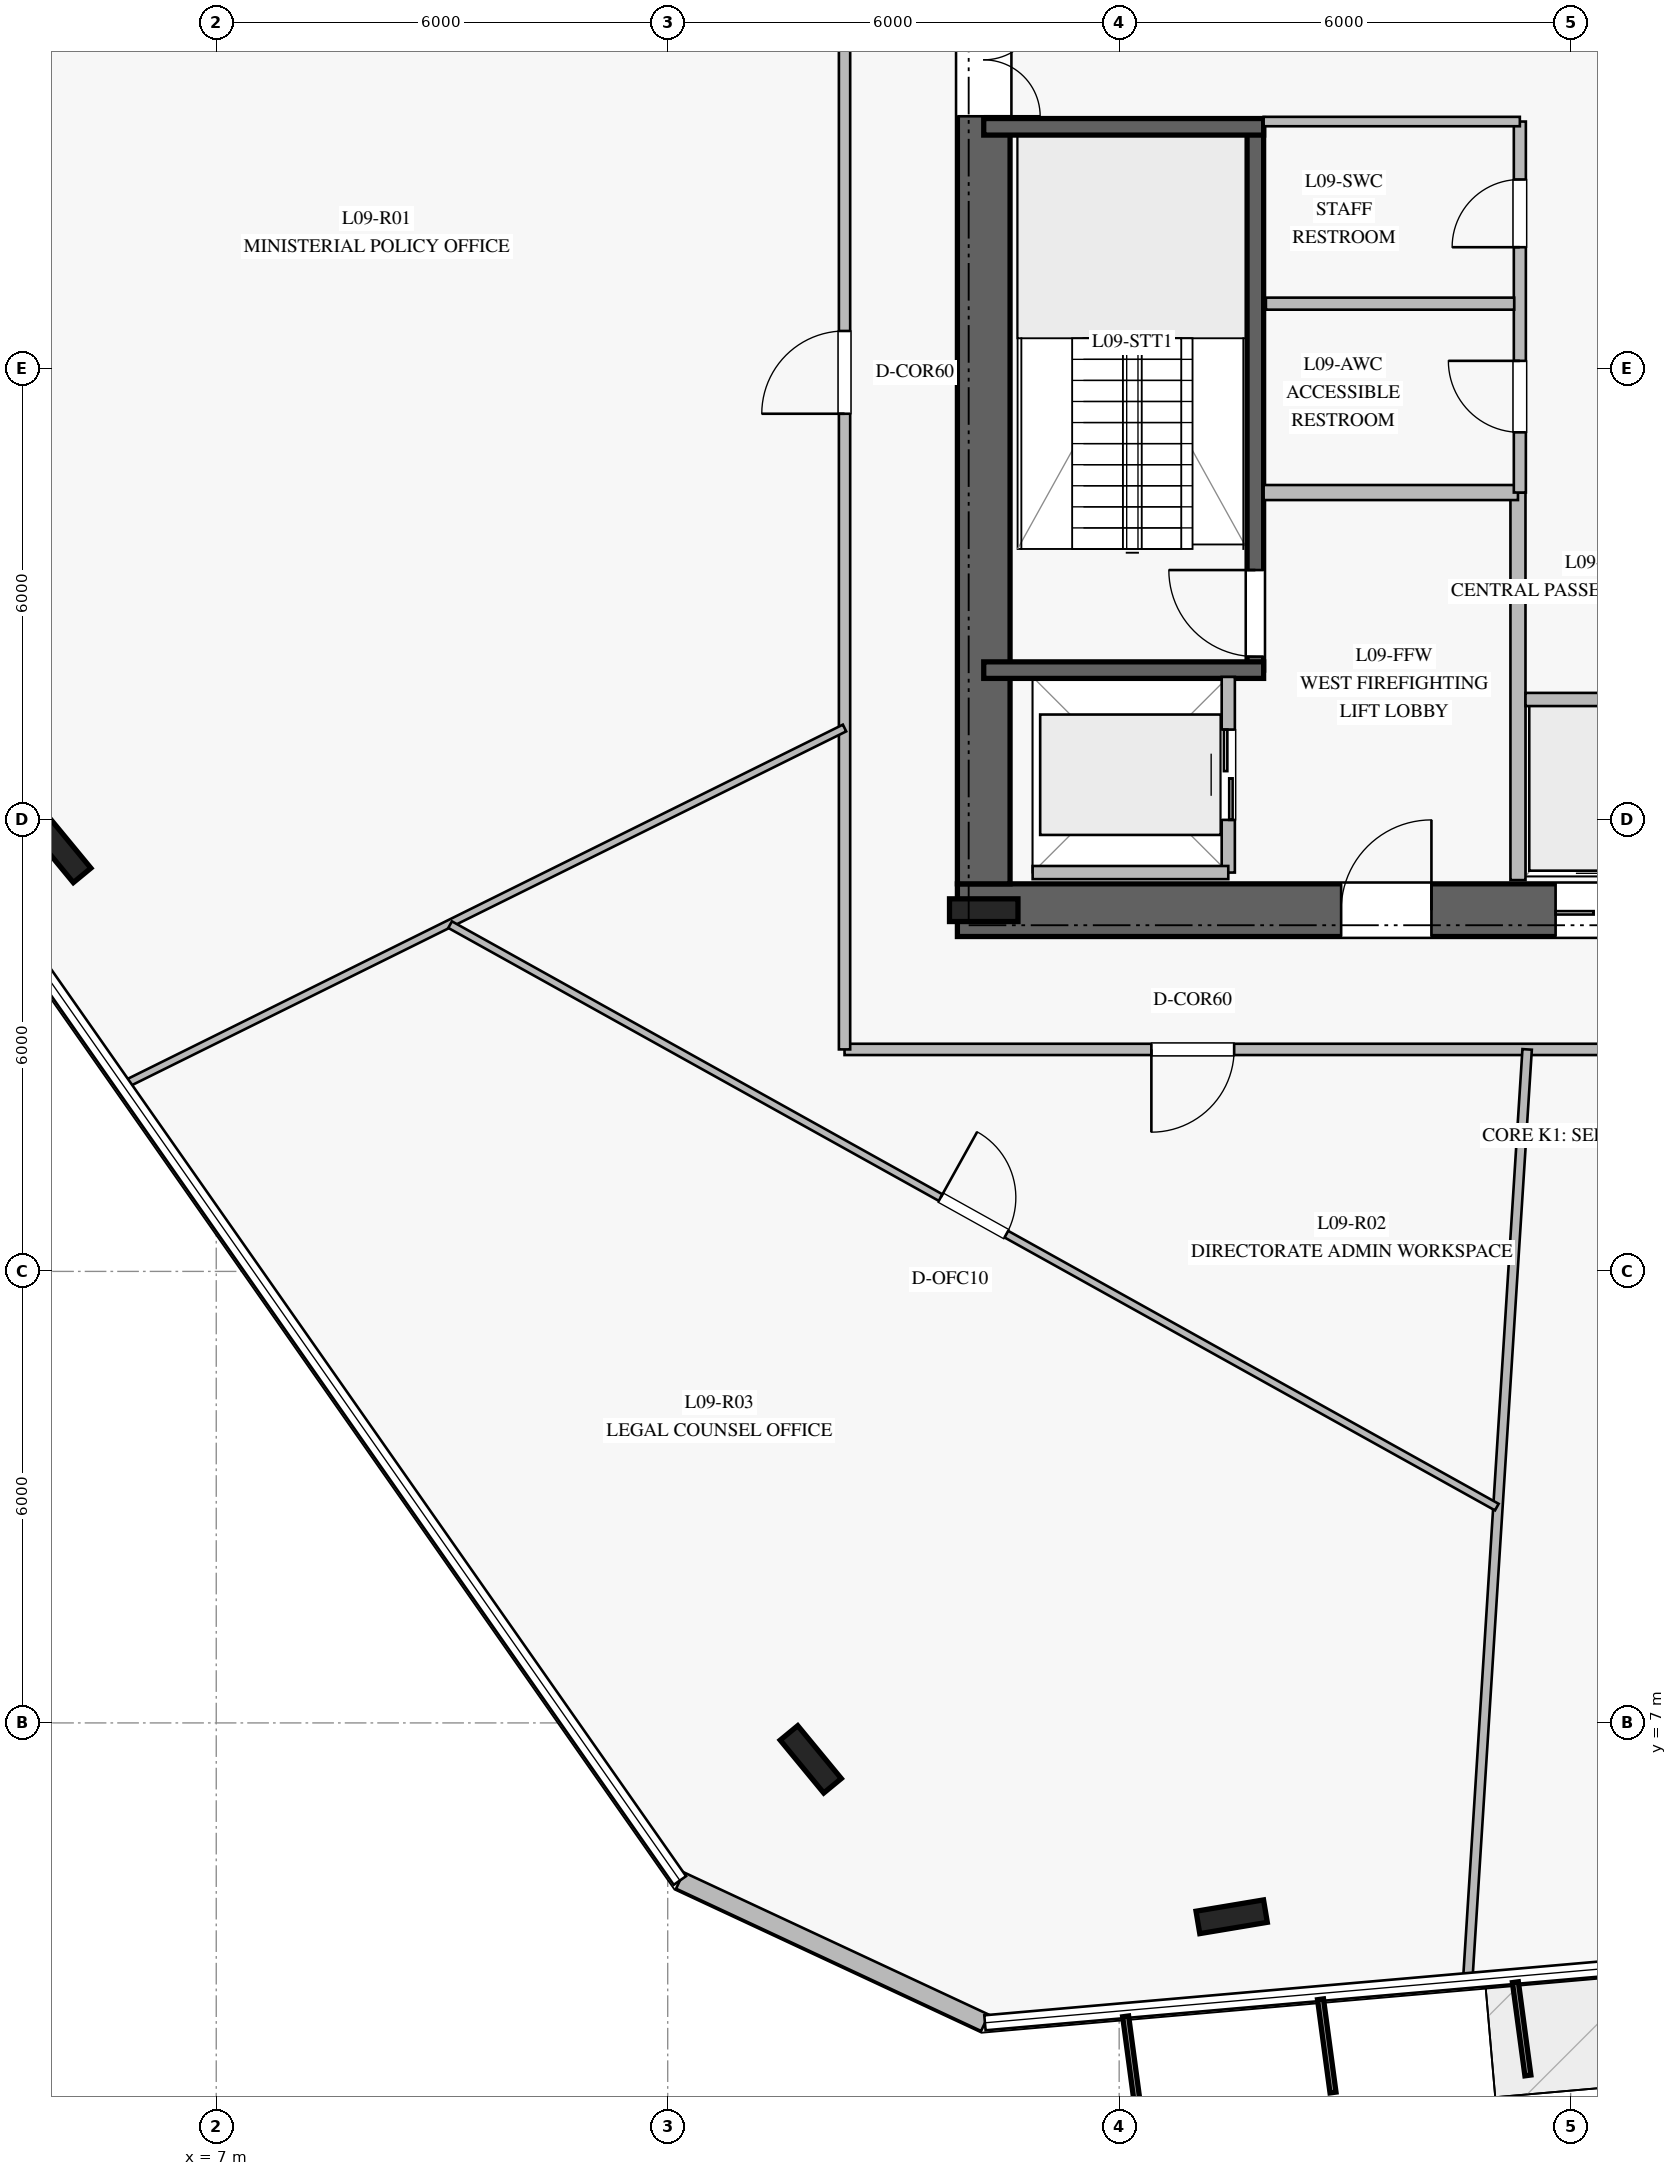
"""IFC4 building model, lengths in metres.
Left out: names, types, materials, properties, quantities, classifications, styles, units other than length and angle.
Written with IfcOpenShell. Run it as: python <this file> out.ifc"""

import sys

from ifc_helpers import new_model, si_unit, direction, frame, frame_2d, origin, origin_2d, place, context, subcontext, project, spatial, rectangle, i_section, extrude, element, fill, save


model = new_model("IFC4")
c1 = context("Model", 3, precision=1e-05, world=origin(), true_north=direction((0.0, 1.0)))
c2 = subcontext(c1, "Body", "Model", "MODEL_VIEW")
j1 = project(units=[si_unit("LENGTHUNIT", "METRE"), si_unit("PLANEANGLEUNIT", "RADIAN")], contexts=[c1])
p1 = place(None, origin())
s1 = spatial("IfcSite", under=j1, at=p1, CompositionType="ELEMENT")
p2 = place(p1, origin())
s2 = spatial("IfcBuilding", under=s1, at=p2, CompositionType="ELEMENT")
p3 = place(p2, frame((0.0, 0.0, 40.0)))
s3 = spatial("IfcBuildingStorey", under=s2, at=p3, CompositionType="ELEMENT", Elevation=40.0)
p4 = place(p3, frame((16.85, 17.8, 0.0), z_axis=(0.0, 0.0, 1.0), x_axis=(1.0, 0.0, 0.0)))
e1 = element("IfcWall", 1, at=p4, inside=s3, PredefinedType="SHEAR", context=c2, shape_type="SweptSolid", body=[
    extrude(rectangle(XDim=16.3, YDim=0.7, at=frame_2d((8.15, 0.0))), origin(), (0.0, 0.0, 1.0), 3.76),
])
p5 = place(p4, frame((5.1, 0.0, 0.0)))
e2 = element("IfcOpeningElement", 2, at=p5, cuts=e1, PredefinedType="OPENING", context=c2, shape_type="SweptSolid", body=[
    extrude(rectangle(XDim=1.2, YDim=2.25, at=frame_2d((0.6, 1.125))), frame((0.0, 0.36, 0.0), z_axis=(0.0, -1.0, 0.0), x_axis=(1.0, 0.0, 0.0)), (0.0, 0.0, 1.0), 0.72),
])
p6 = place(p4, frame((14.05, 0.0, 0.0)))
e3 = element("IfcOpeningElement", 3, at=p6, cuts=e1, PredefinedType="OPENING", context=c2, shape_type="SweptSolid", body=[
    extrude(rectangle(XDim=0.9, YDim=2.1, at=frame_2d((0.45, 1.05))), frame((0.0, 0.36, 0.0), z_axis=(0.0, -1.0, 0.0), x_axis=(1.0, 0.0, 0.0)), (0.0, 0.0, 1.0), 0.72),
])
p7 = place(p4, frame((7.95, 0.0, 0.0)))
e4 = element("IfcOpeningElement", 4, at=p7, cuts=e1, PredefinedType="OPENING", context=c2, shape_type="SweptSolid", body=[
    extrude(rectangle(XDim=1.1, YDim=2.2, at=frame_2d((0.55, 1.1))), frame((0.0, 0.36, 0.0), z_axis=(0.0, -1.0, 0.0), x_axis=(1.0, 0.0, 0.0)), (0.0, 0.0, 1.0), 0.72),
])
p8 = place(p4, frame((9.925, 0.0, 0.0)))
e5 = element("IfcOpeningElement", 5, at=p8, cuts=e1, PredefinedType="OPENING", context=c2, shape_type="SweptSolid", body=[
    extrude(rectangle(XDim=1.1, YDim=2.2, at=frame_2d((0.55, 1.1))), frame((0.0, 0.36, 0.0), z_axis=(0.0, -1.0, 0.0), x_axis=(1.0, 0.0, 0.0)), (0.0, 0.0, 1.0), 0.72),
])
p9 = place(p4, frame((11.9, 0.0, 0.0)))
e6 = element("IfcOpeningElement", 6, at=p9, cuts=e1, PredefinedType="OPENING", context=c2, shape_type="SweptSolid", body=[
    extrude(rectangle(XDim=1.1, YDim=2.2, at=frame_2d((0.55, 1.1))), frame((0.0, 0.36, 0.0), z_axis=(0.0, -1.0, 0.0), x_axis=(1.0, 0.0, 0.0)), (0.0, 0.0, 1.0), 0.72),
])
p10 = place(p3, frame((17.2, 31.85, 0.0), z_axis=(0.0, 0.0, 1.0), x_axis=(0.0, -1.0, 0.0)))
e7 = element("IfcWall", 7, at=p10, inside=s3, PredefinedType="SHEAR", context=c2, shape_type="SweptSolid", body=[
    extrude(rectangle(XDim=13.7, YDim=0.7, at=frame_2d((6.85, 0.0))), origin(), (0.0, 0.0, 1.0), 3.76),
])
p11 = place(p10, frame((2.0, 0.0, 0.0)))
e8 = element("IfcOpeningElement", 8, at=p11, cuts=e7, PredefinedType="OPENING", context=c2, shape_type="SweptSolid", body=[
    extrude(rectangle(XDim=1.5, YDim=2.2, at=frame_2d((0.75, 1.1))), frame((0.0, 0.36, 0.0), z_axis=(0.0, -1.0, 0.0), x_axis=(1.0, 0.0, 0.0)), (0.0, 0.0, 1.0), 0.72),
])
p12 = place(p3, frame((17.2, 17.8, 0.0), z_axis=(0.0, 0.0, 1.0), x_axis=(1.0, 0.0, 0.0)))
e9 = element("IfcColumn", 9, at=p12, inside=s3, PredefinedType="COLUMN", context=c2, shape_type="SweptSolid", body=[
    extrude(i_section(OverallWidth=0.302, OverallDepth=0.91, WebThickness=0.021, FlangeThickness=0.04, at=origin_2d()), origin(), (0.0, 0.0, 1.0), 4.0),
])
p13 = place(p3, frame((20.81, 20.99, 0.0), z_axis=(0.0, 0.0, 1.0), x_axis=(0.0, 1.0, 0.0)))
e10 = element("IfcWall", 10, at=p13, inside=s3, PredefinedType="SOLIDWALL", context=c2, shape_type="SweptSolid", body=[
    extrude(rectangle(XDim=7.22, YDim=0.22, at=frame_2d((3.61, 0.0))), origin(), (0.0, 0.0, 1.0), 3.76),
])
p14 = place(p13, frame((0.18, 0.0, 0.0)))
e11 = element("IfcOpeningElement", 11, at=p14, cuts=e10, PredefinedType="OPENING", context=c2, shape_type="SweptSolid", body=[
    extrude(rectangle(XDim=1.15, YDim=2.2, at=frame_2d((0.575, 1.1))), frame((0.0, 0.12, 0.0), z_axis=(0.0, -1.0, 0.0), x_axis=(1.0, 0.0, 0.0)), (0.0, 0.0, 1.0), 0.24),
])
for number, where, z_axis, x_axis in (
    (12, (17.2, 20.99, 0.0), (0.0, 0.0, 1.0), (1.0, 0.0, 0.0)),
    (13, (17.2, 28.21, 0.0), (0.0, 0.0, 1.0), (1.0, 0.0, 0.0)),
):
    element("IfcWall", number, at=place(p3, frame(where, z_axis=z_axis, x_axis=x_axis)), inside=s3, PredefinedType="SOLIDWALL", context=c2, shape_type="SweptSolid", body=[
        extrude(rectangle(XDim=3.72, YDim=0.22, at=frame_2d((1.86, 0.0))), origin(), (0.0, 0.0, 1.0), 3.76),
    ])
for number, where, z_axis, x_axis in (
    (14, (4.928, 18.614, 0.0), (0.0, 0.0, 1.0), (-0.636, 0.772, 0.0)),
    (15, (14.901, 6.516, 0.0), (0.0, 0.0, 1.0), (-0.636, 0.772, 0.0)),
    (16, (20.495, 4.424, 0.0), (0.0, 0.0, 1.0), (0.986, 0.165, 0.0)),
):
    element("IfcColumn", number, at=place(p3, frame(where, z_axis=z_axis, x_axis=x_axis)), inside=s3, PredefinedType="COLUMN", context=c2, shape_type="SweptSolid", body=[
        extrude(i_section(OverallWidth=0.302, OverallDepth=0.91, WebThickness=0.021, FlangeThickness=0.04, at=origin_2d()), origin(), (0.0, 0.0, 1.0), 4.0),
    ])
p15 = place(p3, frame((13.162, 4.906, 0.0), z_axis=(0.0, 0.0, 1.0), x_axis=(0.906245873292, -0.422751010811, 0.0)))
e17 = element("IfcWall", 17, at=p15, inside=s3, PredefinedType="STANDARD", context=c2, shape_type="SweptSolid", body=[
    extrude(rectangle(XDim=4.473, YDim=0.24, at=frame_2d((2.237, 0.0))), origin(), (0.0, 0.0, 1.0), 3.76),
])
p16 = place(p3, frame((24.3, 18.2, 0.0), z_axis=(0.0, 0.0, 1.0), x_axis=(0.0, 1.0, 0.0)))
e18 = element("IfcWall", 18, at=p16, inside=s3, PredefinedType="PARTITIONING", context=c2, shape_type="SweptSolid", body=[
    extrude(rectangle(XDim=5.15, YDim=0.2, at=frame_2d((2.575, 0.0))), origin(), (0.0, 0.0, 1.0), 3.76),
])
p17 = place(p3, frame((20.92, 23.35, 0.0), z_axis=(0.0, 0.0, 1.0), x_axis=(1.0, 0.0, 0.0)))
e19 = element("IfcWall", 19, at=p17, inside=s3, PredefinedType="PARTITIONING", context=c2, shape_type="SweptSolid", body=[
    extrude(rectangle(XDim=3.38, YDim=0.2, at=frame_2d((1.69, 0.0))), origin(), (0.0, 0.0, 1.0), 3.76),
])
p18 = place(p3, frame((24.325, 23.35, 0.0), z_axis=(0.0, 0.0, 1.0), x_axis=(0.0, 1.0, 0.0)))
e20 = element("IfcWall", 20, at=p18, inside=s3, PredefinedType="PLUMBINGWALL", context=c2, shape_type="SweptSolid", body=[
    extrude(rectangle(XDim=4.93, YDim=0.16, at=frame_2d((2.465, 0.0))), origin(), (0.0, 0.0, 1.0), 3.76),
])
p19 = place(p18, frame((0.8, 0.0, 0.0)))
e21 = element("IfcOpeningElement", 21, at=p19, cuts=e20, PredefinedType="OPENING", context=c2, shape_type="SweptSolid", body=[
    extrude(rectangle(XDim=0.95, YDim=2.1, at=frame_2d((0.475, 1.05))), frame((0.0, 0.09, 0.0), z_axis=(0.0, -1.0, 0.0), x_axis=(1.0, 0.0, 0.0)), (0.0, 0.0, 1.0), 0.18),
])
p20 = place(p18, frame((3.26, 0.0, 0.0)))
e22 = element("IfcOpeningElement", 22, at=p20, cuts=e20, PredefinedType="OPENING", context=c2, shape_type="SweptSolid", body=[
    extrude(rectangle(XDim=0.9, YDim=2.1, at=frame_2d((0.45, 1.05))), frame((0.0, 0.09, 0.0), z_axis=(0.0, -1.0, 0.0), x_axis=(1.0, 0.0, 0.0)), (0.0, 0.0, 1.0), 0.18),
])
p21 = place(p3, frame((20.92, 28.28, 0.0), z_axis=(0.0, 0.0, 1.0), x_axis=(1.0, 0.0, 0.0)))
e23 = element("IfcWall", 23, at=p21, inside=s3, PredefinedType="PARTITIONING", context=c2, shape_type="SweptSolid", body=[
    extrude(rectangle(XDim=3.405, YDim=0.125, at=frame_2d((1.703, 0.0))), origin(), (0.0, 0.0, 1.0), 3.76),
])
p22 = place(p3, frame((20.95, 25.86, 0.0), z_axis=(0.0, 0.0, 1.0), x_axis=(1.0, 0.0, 0.0)))
e24 = element("IfcWall", 24, at=p22, inside=s3, PredefinedType="PLUMBINGWALL", context=c2, shape_type="SweptSolid", body=[
    extrude(rectangle(XDim=3.3, YDim=0.16, at=frame_2d((1.65, 0.0))), origin(), (0.0, 0.0, 1.0), 3.76),
])
p23 = place(p3, frame((24.4, 20.6, 0.0), z_axis=(0.0, 0.0, 1.0), x_axis=(1.0, 0.0, 0.0)))
e25 = element("IfcWall", 25, at=p23, inside=s3, PredefinedType="PARTITIONING", context=c2, shape_type="SweptSolid", body=[
    extrude(rectangle(XDim=1.9, YDim=0.175, at=frame_2d((0.95, 0.0))), origin(), (0.0, 0.0, 1.0), 3.76),
])
p24 = place(p3, frame((20.45, 18.3, 0.0), z_axis=(0.0, 0.0, 1.0), x_axis=(0.0, 1.0, 0.0)))
e26 = element("IfcWall", 26, at=p24, inside=s3, PredefinedType="PARTITIONING", context=c2, shape_type="SweptSolid", body=[
    extrude(rectangle(XDim=2.6, YDim=0.175, at=frame_2d((1.3, 0.0))), origin(), (0.0, 0.0, 1.0), 3.76),
])
p25 = place(p24, frame((0.7, 0.0, 0.0)))
e27 = element("IfcOpeningElement", 27, at=p25, cuts=e26, PredefinedType="OPENING", context=c2, shape_type="SweptSolid", body=[
    extrude(rectangle(XDim=1.2, YDim=2.2, at=frame_2d((0.6, 1.1))), frame((0.0, 0.098, 0.0), z_axis=(0.0, -1.0, 0.0), x_axis=(1.0, 0.0, 0.0)), (0.0, 0.0, 1.0), 0.195),
])
p26 = place(p3, frame((17.85, 18.3, 0.0), z_axis=(0.0, 0.0, 1.0), x_axis=(1.0, 0.0, 0.0)))
e28 = element("IfcWall", 28, at=p26, inside=s3, PredefinedType="PARTITIONING", context=c2, shape_type="SweptSolid", body=[
    extrude(rectangle(XDim=2.6, YDim=0.175, at=frame_2d((1.3, 0.0))), origin(), (0.0, 0.0, 1.0), 3.76),
])
p27 = place(p3, frame((34.65, 15.95, 0.0), z_axis=(0.0, 0.0, 1.0), x_axis=(-1.0, 0.0, 0.0)))
e29 = element("IfcWall", 29, at=p27, inside=s3, PredefinedType="PARTITIONING", context=c2, shape_type="SweptSolid", body=[
    extrude(rectangle(XDim=19.3, YDim=0.15, at=frame_2d((9.65, 0.0))), origin(), (0.0, 0.0, 1.0), 3.21),
])
p28 = place(p27, frame((14.122, 0.0, 0.0)))
e30 = element("IfcOpeningElement", 30, at=p28, cuts=e29, PredefinedType="OPENING", context=c2, shape_type="SweptSolid", body=[
    extrude(rectangle(XDim=1.1, YDim=2.2, at=frame_2d((0.55, 1.1))), frame((0.0, 0.085, 0.0), z_axis=(0.0, -1.0, 0.0), x_axis=(1.0, 0.0, 0.0)), (0.0, 0.0, 1.0), 0.17),
])
p29 = place(p27, frame((4.66, 0.0, 0.0)))
e31 = element("IfcOpeningElement", 31, at=p29, cuts=e29, PredefinedType="OPENING", context=c2, shape_type="SweptSolid", body=[
    extrude(rectangle(XDim=1.1, YDim=2.2, at=frame_2d((0.55, 1.1))), frame((0.0, 0.085, 0.0), z_axis=(0.0, -1.0, 0.0), x_axis=(1.0, 0.0, 0.0)), (0.0, 0.0, 1.0), 0.17),
])
p30 = place(p3, frame((15.35, 15.95, 0.0), z_axis=(0.0, 0.0, 1.0), x_axis=(0.0, 1.0, 0.0)))
e32 = element("IfcWall", 32, at=p30, inside=s3, PredefinedType="PARTITIONING", context=c2, shape_type="SweptSolid", body=[
    extrude(rectangle(XDim=18.1, YDim=0.15, at=frame_2d((9.05, 0.0))), origin(), (0.0, 0.0, 1.0), 3.21),
])
p31 = place(p30, frame((8.447, 0.0, 0.0)))
e33 = element("IfcOpeningElement", 33, at=p31, cuts=e32, PredefinedType="OPENING", context=c2, shape_type="SweptSolid", body=[
    extrude(rectangle(XDim=1.1, YDim=2.2, at=frame_2d((0.55, 1.1))), frame((0.0, 0.085, 0.0), z_axis=(0.0, -1.0, 0.0), x_axis=(1.0, 0.0, 0.0)), (0.0, 0.0, 1.0), 0.17),
])
p32 = place(p3, frame((15.35, 20.221, 0.0), z_axis=(0.0, 0.0, 1.0), x_axis=(-0.896125940775, -0.443799840322, 0.0)))
e34 = element("IfcWall", 34, at=p32, inside=s3, PredefinedType="MOVABLE", context=c2, shape_type="SweptSolid", body=[
    extrude(rectangle(XDim=10.68, YDim=0.1, at=frame_2d((5.34, 0.0))), origin(), (0.0, 0.0, 1.0), 3.05),
])
p33 = place(p3, frame((24.422, 15.95, 0.0), z_axis=(0.0, 0.0, 1.0), x_axis=(-0.063731074796, -0.997967108729, 0.0)))
e35 = element("IfcWall", 35, at=p33, inside=s3, PredefinedType="PARTITIONING", context=c2, shape_type="SweptSolid", body=[
    extrude(rectangle(XDim=12.381, YDim=0.125, at=frame_2d((6.19, 0.0))), origin(), (0.0, 0.0, 1.0), 3.02),
])
p34 = place(p3, frame((10.108, 17.608, 0.0), z_axis=(0.0, 0.0, 1.0), x_axis=(0.873848208076, -0.486198837147, 0.0)))
e36 = element("IfcWall", 36, at=p34, inside=s3, PredefinedType="MOVABLE", context=c2, shape_type="SweptSolid", body=[
    extrude(rectangle(XDim=15.919, YDim=0.1, at=frame_2d((7.96, 0.0))), origin(), (0.0, 0.0, 1.0), 3.02),
])
p35 = place(p34, frame((7.46, 0.0, 0.0)))
e37 = element("IfcOpeningElement", 37, at=p35, cuts=e36, PredefinedType="OPENING", context=c2, shape_type="SweptSolid", body=[
    extrude(rectangle(XDim=1.0, YDim=2.15, at=frame_2d((0.5, 1.075))), frame((0.0, 0.06, 0.0), z_axis=(0.0, -1.0, 0.0), x_axis=(1.0, 0.0, 0.0)), (0.0, 0.0, 1.0), 0.12),
])
p36 = place(p14, origin())
e38 = element("IfcDoor", 38, at=p36, inside=s3, OperationType="SINGLE_SWING_RIGHT", PredefinedType="DOOR", context=c2, shape_type="SweptSolid", body=[
    extrude(rectangle(XDim=1.15, YDim=2.2, at=frame_2d((0.575, 1.1))), frame((0.0, 0.025, 0.0), z_axis=(0.0, -1.0, 0.0), x_axis=(1.0, 0.0, 0.0)), (0.0, 0.0, 1.0), 0.05),
])
fill(e11, e38)
p37 = place(p5, origin())
e39 = element("IfcDoor", 39, at=p37, inside=s3, OperationType="SINGLE_SWING_RIGHT", PredefinedType="DOOR", context=c2, shape_type="SweptSolid", body=[
    extrude(rectangle(XDim=1.2, YDim=2.25, at=frame_2d((0.6, 1.125))), frame((0.0, 0.025, 0.0), z_axis=(0.0, -1.0, 0.0), x_axis=(1.0, 0.0, 0.0)), (0.0, 0.0, 1.0), 0.05),
])
fill(e2, e39)
p38 = place(p11, origin())
e40 = element("IfcDoor", 40, at=p38, inside=s3, OperationType="DOUBLE_DOOR_SINGLE_SWING", PredefinedType="DOOR", context=c2, shape_type="SweptSolid", body=[
    extrude(rectangle(XDim=1.5, YDim=2.2, at=frame_2d((0.75, 1.1))), frame((0.0, 0.025, 0.0), z_axis=(0.0, -1.0, 0.0), x_axis=(1.0, 0.0, 0.0)), (0.0, 0.0, 1.0), 0.05),
])
fill(e8, e40)
p39 = place(p19, origin())
e41 = element("IfcDoor", 41, at=p39, inside=s3, OperationType="SINGLE_SWING_RIGHT", PredefinedType="DOOR", context=c2, shape_type="SweptSolid", body=[
    extrude(rectangle(XDim=0.95, YDim=2.1, at=frame_2d((0.475, 1.05))), frame((0.0, 0.025, 0.0), z_axis=(0.0, -1.0, 0.0), x_axis=(1.0, 0.0, 0.0)), (0.0, 0.0, 1.0), 0.05),
])
fill(e21, e41)
p40 = place(p20, origin())
e42 = element("IfcDoor", 42, at=p40, inside=s3, OperationType="SINGLE_SWING_LEFT", PredefinedType="DOOR", context=c2, shape_type="SweptSolid", body=[
    extrude(rectangle(XDim=0.9, YDim=2.1, at=frame_2d((0.45, 1.05))), frame((0.0, 0.025, 0.0), z_axis=(0.0, -1.0, 0.0), x_axis=(1.0, 0.0, 0.0)), (0.0, 0.0, 1.0), 0.05),
])
fill(e22, e42)
p41 = place(p7, origin())
e43 = element("IfcDoor", 43, at=p41, inside=s3, OperationType="DOUBLE_DOOR_SLIDING", PredefinedType="DOOR", context=c2, shape_type="SweptSolid", body=[
    extrude(rectangle(XDim=1.1, YDim=2.2, at=frame_2d((0.55, 1.1))), frame((0.0, 0.025, 0.0), z_axis=(0.0, -1.0, 0.0), x_axis=(1.0, 0.0, 0.0)), (0.0, 0.0, 1.0), 0.05),
])
fill(e4, e43)
p42 = place(p25, origin())
e44 = element("IfcDoor", 44, at=p42, inside=s3, OperationType="DOUBLE_DOOR_SLIDING", PredefinedType="DOOR", context=c2, shape_type="SweptSolid", body=[
    extrude(rectangle(XDim=1.2, YDim=2.2, at=frame_2d((0.6, 1.1))), frame((0.0, 0.025, 0.0), z_axis=(0.0, -1.0, 0.0), x_axis=(1.0, 0.0, 0.0)), (0.0, 0.0, 1.0), 0.05),
])
fill(e27, e44)
p43 = place(p31, origin())
e45 = element("IfcDoor", 45, at=p43, inside=s3, OperationType="SINGLE_SWING_LEFT", PredefinedType="DOOR", context=c2, shape_type="SweptSolid", body=[
    extrude(rectangle(XDim=1.1, YDim=2.2, at=frame_2d((0.55, 1.1))), frame((0.0, 0.025, 0.0), z_axis=(0.0, -1.0, 0.0), x_axis=(1.0, 0.0, 0.0)), (0.0, 0.0, 1.0), 0.05),
])
fill(e33, e45)
p44 = place(p28, origin())
e46 = element("IfcDoor", 46, at=p44, inside=s3, OperationType="SINGLE_SWING_RIGHT", PredefinedType="DOOR", context=c2, shape_type="SweptSolid", body=[
    extrude(rectangle(XDim=1.1, YDim=2.2, at=frame_2d((0.55, 1.1))), frame((0.0, 0.025, 0.0), z_axis=(0.0, -1.0, 0.0), x_axis=(1.0, 0.0, 0.0)), (0.0, 0.0, 1.0), 0.05),
])
fill(e30, e46)
p45 = place(p35, origin())
e47 = element("IfcDoor", 47, at=p45, inside=s3, OperationType="SINGLE_SWING_LEFT", PredefinedType="DOOR", context=c2, shape_type="SweptSolid", body=[
    extrude(rectangle(XDim=1.0, YDim=2.15, at=frame_2d((0.5, 1.075))), frame((0.0, 0.025, 0.0), z_axis=(0.0, -1.0, 0.0), x_axis=(1.0, 0.0, 0.0)), (0.0, 0.0, 1.0), 0.05),
])
fill(e37, e47)
save(model, sys.argv[1])
